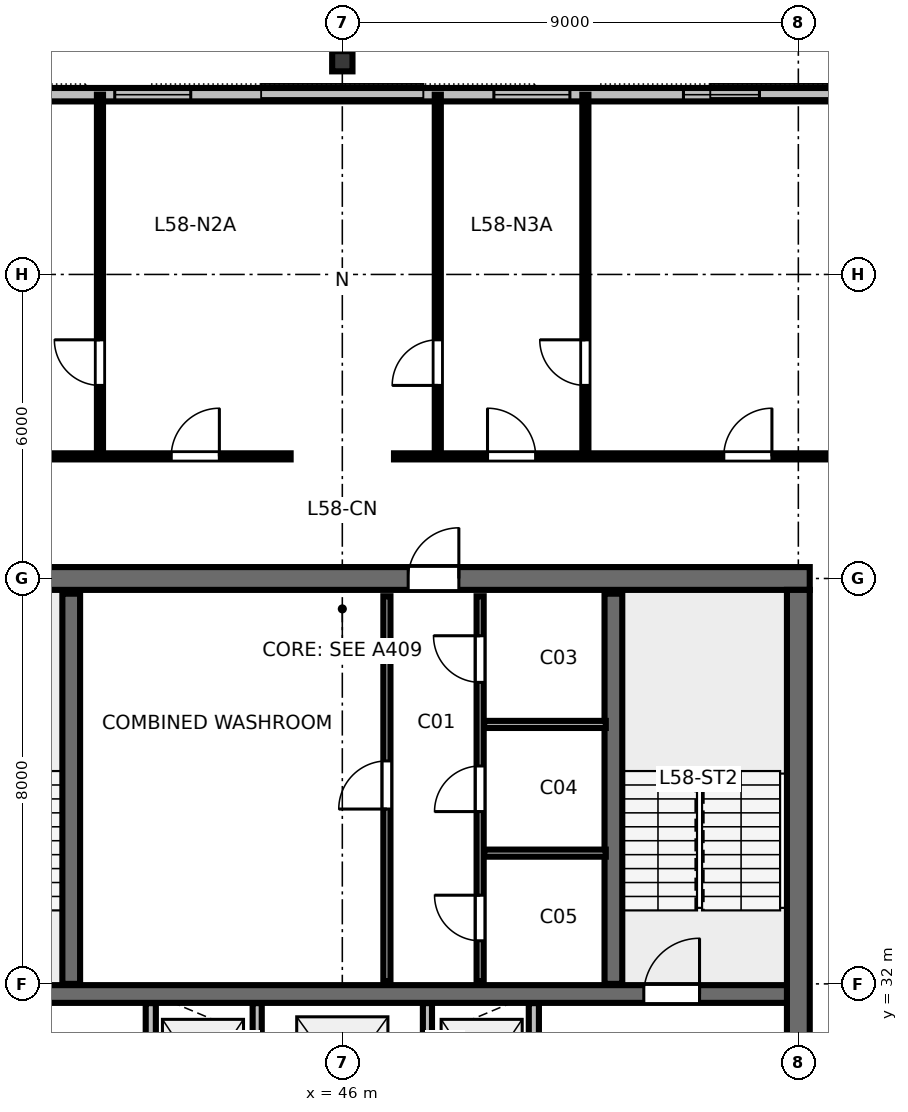
"""IFC4 building model, lengths in metres.
Left out: names, types, materials, properties, quantities, classifications, styles, units other than length and angle.
Written with IfcOpenShell. Run it as: python <this file> out.ifc"""

import sys

from ifc_helpers import new_model, si_unit, direction, frame, frame_2d, origin, origin_2d, place, context, subcontext, project, spatial, rectangle, i_section, extrude, element, fill, save


model = new_model("IFC4")
c1 = context("Model", 3, precision=1e-05, world=origin(), true_north=direction((0.0, 1.0)))
c2 = subcontext(c1, "Body", "Model", "MODEL_VIEW")
j1 = project(units=[si_unit("LENGTHUNIT", "METRE"), si_unit("PLANEANGLEUNIT", "RADIAN")], contexts=[c1])
p1 = place(None, origin())
s1 = spatial("IfcSite", under=j1, at=p1, CompositionType="ELEMENT")
p2 = place(p1, origin())
s2 = spatial("IfcBuilding", under=s1, at=p2, CompositionType="ELEMENT")
p3 = place(p2, frame((0.0, 0.0, 220.2)))
s3 = spatial("IfcBuildingStorey", under=s2, at=p3, CompositionType="ELEMENT", Elevation=220.2)
p4 = place(p3, frame((36.775, 40.0, 0.0), z_axis=(0.0, 0.0, 1.0), x_axis=(1.0, 0.0, 0.0)))
e1 = element("IfcWall", 1, at=p4, inside=s3, PredefinedType="SHEAR", context=c2, shape_type="SweptSolid", body=[
    extrude(rectangle(XDim=18.45, YDim=0.45, at=frame_2d((9.225, 0.0))), origin(), (0.0, 0.0, 1.0), 3.36),
])
p5 = place(p4, frame((10.525, 0.0, 0.0)))
e2 = element("IfcOpeningElement", 2, at=p5, cuts=e1, PredefinedType="OPENING", context=c2, shape_type="SweptSolid", body=[
    extrude(rectangle(XDim=1.0, YDim=2.15, at=frame_2d((0.5, 1.075))), frame((0.0, 0.235, 0.0), z_axis=(0.0, -1.0, 0.0), x_axis=(1.0, 0.0, 0.0)), (0.0, 0.0, 1.0), 0.47),
])
p6 = place(p3, frame((55.0, 24.225, 0.0), z_axis=(0.0, 0.0, 1.0), x_axis=(0.0, 1.0, 0.0)))
e3 = element("IfcWall", 3, at=p6, inside=s3, PredefinedType="SHEAR", context=c2, shape_type="SweptSolid", body=[
    extrude(rectangle(XDim=15.55, YDim=0.45, at=frame_2d((7.775, 0.0))), origin(), (0.0, 0.0, 1.0), 3.36),
])
p7 = place(p6, frame((5.3, 0.0, 0.0)))
e4 = element("IfcOpeningElement", 4, at=p7, cuts=e3, PredefinedType="OPENING", context=c2, shape_type="SweptSolid", body=[
    extrude(rectangle(XDim=1.15, YDim=2.15, at=frame_2d((0.575, 1.075))), frame((0.0, 0.235, 0.0), z_axis=(0.0, -1.0, 0.0), x_axis=(1.0, 0.0, 0.0)), (0.0, 0.0, 1.0), 0.47),
])
p8 = place(p3, frame((37.225, 31.8, 0.0), z_axis=(0.0, 0.0, 1.0), x_axis=(1.0, 0.0, 0.0)))
e5 = element("IfcWall", 5, at=p8, inside=s3, PredefinedType="SHEAR", context=c2, shape_type="SweptSolid", body=[
    extrude(rectangle(XDim=17.55, YDim=0.35, at=frame_2d((8.775, 0.0))), origin(), (0.0, 0.0, 1.0), 3.36),
])
p9 = place(p8, frame((0.825, 0.0, 0.0)))
e6 = element("IfcOpeningElement", 6, at=p9, cuts=e5, PredefinedType="OPENING", context=c2, shape_type="SweptSolid", body=[
    extrude(rectangle(XDim=1.1, YDim=2.15, at=frame_2d((0.55, 1.075))), frame((0.0, 0.185, 0.0), z_axis=(0.0, -1.0, 0.0), x_axis=(1.0, 0.0, 0.0)), (0.0, 0.0, 1.0), 0.37),
])
p10 = place(p8, frame((14.725, 0.0, 0.0)))
e7 = element("IfcOpeningElement", 7, at=p10, cuts=e5, PredefinedType="OPENING", context=c2, shape_type="SweptSolid", body=[
    extrude(rectangle(XDim=1.1, YDim=2.15, at=frame_2d((0.55, 1.075))), frame((0.0, 0.185, 0.0), z_axis=(0.0, -1.0, 0.0), x_axis=(1.0, 0.0, 0.0)), (0.0, 0.0, 1.0), 0.37),
])
p11 = place(p3, frame((46.0, 50.207, 0.0), z_axis=(0.0, 0.0, 1.0), x_axis=(1.0, 0.0, 0.0)))
e8 = element("IfcColumn", 8, at=p11, inside=s3, PredefinedType="COLUMN", context=c2, shape_type="SweptSolid", body=[
    extrude(i_section(OverallWidth=0.401, OverallDepth=0.399, WebThickness=0.025, FlangeThickness=0.04, FilletRadius=0.025, at=origin_2d()), origin(), (0.0, 0.0, 1.0), 3.373),
])
p12 = place(p3, frame((60.195, 49.547, 0.0), z_axis=(0.0, 0.0, 1.0), x_axis=(-1.0, 0.0, 0.0)))
e9 = element("IfcWall", 9, at=p12, inside=s3, PredefinedType="STANDARD", context=c2, shape_type="SweptSolid", body=[
    extrude(rectangle(XDim=28.389, YDim=0.265, at=frame_2d((14.195, 0.0))), origin(), (0.0, 0.0, 1.0), 3.375),
])
p13 = place(p12, frame((2.221, 0.0, 0.85)))
e10 = element("IfcOpeningElement", 10, at=p13, cuts=e9, PredefinedType="OPENING", context=c2, shape_type="SweptSolid", body=[
    extrude(rectangle(XDim=1.5, YDim=1.85, at=frame_2d((0.75, 0.925))), frame((0.0, 0.142, 0.0), z_axis=(0.0, -1.0, 0.0), x_axis=(1.0, 0.0, 0.0)), (0.0, 0.0, 1.0), 0.285),
])
p14 = place(p12, frame((5.962, 0.0, 0.85)))
e11 = element("IfcOpeningElement", 11, at=p14, cuts=e9, PredefinedType="OPENING", context=c2, shape_type="SweptSolid", body=[
    extrude(rectangle(XDim=1.5, YDim=1.85, at=frame_2d((0.75, 0.925))), frame((0.0, 0.142, 0.0), z_axis=(0.0, -1.0, 0.0), x_axis=(1.0, 0.0, 0.0)), (0.0, 0.0, 1.0), 0.285),
])
p15 = place(p12, frame((9.703, 0.0, 0.85)))
e12 = element("IfcOpeningElement", 12, at=p15, cuts=e9, PredefinedType="OPENING", context=c2, shape_type="SweptSolid", body=[
    extrude(rectangle(XDim=1.5, YDim=1.85, at=frame_2d((0.75, 0.925))), frame((0.0, 0.142, 0.0), z_axis=(0.0, -1.0, 0.0), x_axis=(1.0, 0.0, 0.0)), (0.0, 0.0, 1.0), 0.285),
])
p16 = place(p12, frame((17.186, 0.0, 0.85)))
e13 = element("IfcOpeningElement", 13, at=p16, cuts=e9, PredefinedType="OPENING", context=c2, shape_type="SweptSolid", body=[
    extrude(rectangle(XDim=1.5, YDim=1.85, at=frame_2d((0.75, 0.925))), frame((0.0, 0.142, 0.0), z_axis=(0.0, -1.0, 0.0), x_axis=(1.0, 0.0, 0.0)), (0.0, 0.0, 1.0), 0.285),
])
p17 = place(p12, frame((20.927, 0.0, 0.85)))
e14 = element("IfcOpeningElement", 14, at=p17, cuts=e9, PredefinedType="OPENING", context=c2, shape_type="SweptSolid", body=[
    extrude(rectangle(XDim=1.5, YDim=1.85, at=frame_2d((0.75, 0.925))), frame((0.0, 0.142, 0.0), z_axis=(0.0, -1.0, 0.0), x_axis=(1.0, 0.0, 0.0)), (0.0, 0.0, 1.0), 0.285),
])
p18 = place(p12, frame((24.668, 0.0, 0.85)))
e15 = element("IfcOpeningElement", 15, at=p18, cuts=e9, PredefinedType="OPENING", context=c2, shape_type="SweptSolid", body=[
    extrude(rectangle(XDim=1.5, YDim=1.85, at=frame_2d((0.75, 0.925))), frame((0.0, 0.142, 0.0), z_axis=(0.0, -1.0, 0.0), x_axis=(1.0, 0.0, 0.0)), (0.0, 0.0, 1.0), 0.285),
])
for number, where, z_axis, x_axis in (
    (16, (40.65, 32.0, 0.0), (0.0, 0.0, 1.0), (0.0, 1.0, 0.0)),
    (17, (51.35, 32.0, 0.0), (0.0, 0.0, 1.0), (0.0, 1.0, 0.0)),
):
    element("IfcWall", number, at=place(p3, frame(where, z_axis=z_axis, x_axis=x_axis)), inside=s3, PredefinedType="SHEAR", context=c2, shape_type="SweptSolid", body=[
        extrude(rectangle(XDim=7.7, YDim=0.35, at=frame_2d((3.85, 0.0))), origin(), (0.0, 0.0, 1.0), 3.6),
    ])
p19 = place(p3, frame((46.88, 32.05, 0.0), z_axis=(0.0, 0.0, 1.0), x_axis=(0.0, 1.0, 0.0)))
e18 = element("IfcWall", 18, at=p19, inside=s3, PredefinedType="PARTITIONING", context=c2, shape_type="SweptSolid", body=[
    extrude(rectangle(XDim=7.6, YDim=0.14, at=frame_2d((3.8, 0.0))), origin(), (0.0, 0.0, 1.0), 3.375),
])
p20 = place(p19, frame((3.4, 0.0, 0.0)))
e19 = element("IfcOpeningElement", 19, at=p20, cuts=e18, PredefinedType="OPENING", context=c2, shape_type="SweptSolid", body=[
    extrude(rectangle(XDim=0.95, YDim=2.15, at=frame_2d((0.475, 1.075))), frame((0.0, 0.08, 0.0), z_axis=(0.0, -1.0, 0.0), x_axis=(1.0, 0.0, 0.0)), (0.0, 0.0, 1.0), 0.16),
])
p21 = place(p3, frame((48.72, 32.05, 0.0), z_axis=(0.0, 0.0, 1.0), x_axis=(0.0, 1.0, 0.0)))
e20 = element("IfcWall", 20, at=p21, inside=s3, PredefinedType="PARTITIONING", context=c2, shape_type="SweptSolid", body=[
    extrude(rectangle(XDim=7.6, YDim=0.14, at=frame_2d((3.8, 0.0))), origin(), (0.0, 0.0, 1.0), 3.375),
])
p22 = place(p21, frame((0.8, 0.0, 0.0)))
e21 = element("IfcOpeningElement", 21, at=p22, cuts=e20, PredefinedType="OPENING", context=c2, shape_type="SweptSolid", body=[
    extrude(rectangle(XDim=0.9, YDim=2.15, at=frame_2d((0.45, 1.075))), frame((0.0, 0.08, 0.0), z_axis=(0.0, -1.0, 0.0), x_axis=(1.0, 0.0, 0.0)), (0.0, 0.0, 1.0), 0.16),
])
p23 = place(p21, frame((3.35, 0.0, 0.0)))
e22 = element("IfcOpeningElement", 22, at=p23, cuts=e20, PredefinedType="OPENING", context=c2, shape_type="SweptSolid", body=[
    extrude(rectangle(XDim=0.9, YDim=2.15, at=frame_2d((0.45, 1.075))), frame((0.0, 0.08, 0.0), z_axis=(0.0, -1.0, 0.0), x_axis=(1.0, 0.0, 0.0)), (0.0, 0.0, 1.0), 0.16),
])
p24 = place(p21, frame((5.9, 0.0, 0.0)))
e23 = element("IfcOpeningElement", 23, at=p24, cuts=e20, PredefinedType="OPENING", context=c2, shape_type="SweptSolid", body=[
    extrude(rectangle(XDim=0.92, YDim=2.15, at=frame_2d((0.46, 1.075))), frame((0.0, 0.08, 0.0), z_axis=(0.0, -1.0, 0.0), x_axis=(1.0, 0.0, 0.0)), (0.0, 0.0, 1.0), 0.16),
])
for number, where, z_axis, x_axis in (
    (24, (48.8, 34.58, 0.0), (0.0, 0.0, 1.0), (1.0, 0.0, 0.0)),
    (25, (48.8, 37.12, 0.0), (0.0, 0.0, 1.0), (1.0, 0.0, 0.0)),
):
    element("IfcWall", number, at=place(p3, frame(where, z_axis=z_axis, x_axis=x_axis)), inside=s3, PredefinedType="PARTITIONING", context=c2, shape_type="SweptSolid", body=[
        extrude(rectangle(XDim=2.4, YDim=0.14, at=frame_2d((1.2, 0.0))), origin(), (0.0, 0.0, 1.0), 3.375),
    ])
p25 = place(p3, frame((42.22, 28.58, 0.0), z_axis=(0.0, 0.0, 1.0), x_axis=(0.0, 1.0, 0.0)))
e26 = element("IfcWall", 26, at=p25, inside=s3, PredefinedType="PARTITIONING", context=c2, shape_type="SweptSolid", body=[
    extrude(rectangle(XDim=3.04, YDim=0.2, at=frame_2d((1.52, 0.0))), origin(), (0.0, 0.0, 1.0), 3.375),
])
p26 = place(p25, frame((0.95, 0.0, 0.0)))
e27 = element("IfcOpeningElement", 27, at=p26, cuts=e26, PredefinedType="OPENING", context=c2, shape_type="SweptSolid", body=[
    extrude(rectangle(XDim=1.05, YDim=2.15, at=frame_2d((0.525, 1.075))), frame((0.0, 0.11, 0.0), z_axis=(0.0, -1.0, 0.0), x_axis=(1.0, 0.0, 0.0)), (0.0, 0.0, 1.0), 0.22),
])
p27 = place(p3, frame((49.78, 28.58, 0.0), z_axis=(0.0, 0.0, 1.0), x_axis=(0.0, 1.0, 0.0)))
e28 = element("IfcWall", 28, at=p27, inside=s3, PredefinedType="PARTITIONING", context=c2, shape_type="SweptSolid", body=[
    extrude(rectangle(XDim=3.04, YDim=0.2, at=frame_2d((1.52, 0.0))), origin(), (0.0, 0.0, 1.0), 3.375),
])
p28 = place(p27, frame((0.95, 0.0, 0.0)))
e29 = element("IfcOpeningElement", 29, at=p28, cuts=e28, PredefinedType="OPENING", context=c2, shape_type="SweptSolid", body=[
    extrude(rectangle(XDim=1.05, YDim=2.15, at=frame_2d((0.525, 1.075))), frame((0.0, 0.11, 0.0), z_axis=(0.0, -1.0, 0.0), x_axis=(1.0, 0.0, 0.0)), (0.0, 0.0, 1.0), 0.22),
])
for number, where, z_axis, x_axis in (
    (30, (44.32, 28.58, 0.0), (0.0, 0.0, 1.0), (0.0, 1.0, 0.0)),
    (31, (47.68, 28.58, 0.0), (0.0, 0.0, 1.0), (0.0, 1.0, 0.0)),
):
    element("IfcWall", number, at=place(p3, frame(where, z_axis=z_axis, x_axis=x_axis)), inside=s3, PredefinedType="PARTITIONING", context=c2, shape_type="SweptSolid", body=[
        extrude(rectangle(XDim=3.04, YDim=0.18, at=frame_2d((1.52, 0.0))), origin(), (0.0, 0.0, 1.0), 3.375),
    ])
p29 = place(p3, frame((41.217, 42.41, 0.0), z_axis=(0.0, 0.0, 1.0), x_axis=(0.0, 1.0, 0.0)))
e32 = element("IfcWall", 32, at=p29, inside=s3, PredefinedType="PARTITIONING", context=c2, shape_type="SweptSolid", body=[
    extrude(rectangle(XDim=7.137, YDim=0.12, at=frame_2d((3.569, 0.0))), origin(), (0.0, 0.0, 1.0), 2.655),
])
p30 = place(p29, frame((1.4, 0.0, 0.0)))
e33 = element("IfcOpeningElement", 33, at=p30, cuts=e32, PredefinedType="OPENING", context=c2, shape_type="SweptSolid", body=[
    extrude(rectangle(XDim=0.9, YDim=2.15, at=frame_2d((0.45, 1.075))), frame((0.0, 0.07, 0.0), z_axis=(0.0, -1.0, 0.0), x_axis=(1.0, 0.0, 0.0)), (0.0, 0.0, 1.0), 0.14),
])
p31 = place(p3, frame((47.885, 42.41, 0.0), z_axis=(0.0, 0.0, 1.0), x_axis=(0.0, 1.0, 0.0)))
e34 = element("IfcWall", 34, at=p31, inside=s3, PredefinedType="PARTITIONING", context=c2, shape_type="SweptSolid", body=[
    extrude(rectangle(XDim=7.137, YDim=0.12, at=frame_2d((3.569, 0.0))), origin(), (0.0, 0.0, 1.0), 2.655),
])
p32 = place(p31, frame((1.4, 0.0, 0.0)))
e35 = element("IfcOpeningElement", 35, at=p32, cuts=e34, PredefinedType="OPENING", context=c2, shape_type="SweptSolid", body=[
    extrude(rectangle(XDim=0.9, YDim=2.15, at=frame_2d((0.45, 1.075))), frame((0.0, 0.07, 0.0), z_axis=(0.0, -1.0, 0.0), x_axis=(1.0, 0.0, 0.0)), (0.0, 0.0, 1.0), 0.14),
])
p33 = place(p3, frame((50.797, 42.41, 0.0), z_axis=(0.0, 0.0, 1.0), x_axis=(0.0, 1.0, 0.0)))
e36 = element("IfcWall", 36, at=p33, inside=s3, PredefinedType="PARTITIONING", context=c2, shape_type="SweptSolid", body=[
    extrude(rectangle(XDim=7.137, YDim=0.12, at=frame_2d((3.569, 0.0))), origin(), (0.0, 0.0, 1.0), 2.655),
])
p34 = place(p33, frame((1.4, 0.0, 0.0)))
e37 = element("IfcOpeningElement", 37, at=p34, cuts=e36, PredefinedType="OPENING", context=c2, shape_type="SweptSolid", body=[
    extrude(rectangle(XDim=0.9, YDim=2.15, at=frame_2d((0.45, 1.075))), frame((0.0, 0.07, 0.0), z_axis=(0.0, -1.0, 0.0), x_axis=(1.0, 0.0, 0.0)), (0.0, 0.0, 1.0), 0.14),
])
p35 = place(p3, frame((34.65, 42.41, 0.0), z_axis=(0.0, 0.0, 1.0), x_axis=(1.0, 0.0, 0.0)))
e38 = element("IfcWall", 38, at=p35, inside=s3, PredefinedType="PARTITIONING", context=c2, shape_type="SweptSolid", body=[
    extrude(rectangle(XDim=10.33, YDim=0.12, at=frame_2d((5.165, 0.0))), origin(), (0.0, 0.0, 1.0), 2.655),
])
p36 = place(p35, frame((2.878, 0.0, 0.0)))
e39 = element("IfcOpeningElement", 39, at=p36, cuts=e38, PredefinedType="OPENING", context=c2, shape_type="SweptSolid", body=[
    extrude(rectangle(XDim=0.95, YDim=2.15, at=frame_2d((0.475, 1.075))), frame((0.0, 0.07, 0.0), z_axis=(0.0, -1.0, 0.0), x_axis=(1.0, 0.0, 0.0)), (0.0, 0.0, 1.0), 0.14),
])
p37 = place(p35, frame((7.974, 0.0, 0.0)))
e40 = element("IfcOpeningElement", 40, at=p37, cuts=e38, PredefinedType="OPENING", context=c2, shape_type="SweptSolid", body=[
    extrude(rectangle(XDim=0.95, YDim=2.15, at=frame_2d((0.475, 1.075))), frame((0.0, 0.07, 0.0), z_axis=(0.0, -1.0, 0.0), x_axis=(1.0, 0.0, 0.0)), (0.0, 0.0, 1.0), 0.14),
])
p38 = place(p3, frame((47.02, 42.41, 0.0), z_axis=(0.0, 0.0, 1.0), x_axis=(1.0, 0.0, 0.0)))
e41 = element("IfcWall", 41, at=p38, inside=s3, PredefinedType="PARTITIONING", context=c2, shape_type="SweptSolid", body=[
    extrude(rectangle(XDim=10.33, YDim=0.12, at=frame_2d((5.165, 0.0))), origin(), (0.0, 0.0, 1.0), 2.655),
])
p39 = place(p38, frame((1.846, 0.0, 0.0)))
e42 = element("IfcOpeningElement", 42, at=p39, cuts=e41, PredefinedType="OPENING", context=c2, shape_type="SweptSolid", body=[
    extrude(rectangle(XDim=0.95, YDim=2.15, at=frame_2d((0.475, 1.075))), frame((0.0, 0.07, 0.0), z_axis=(0.0, -1.0, 0.0), x_axis=(1.0, 0.0, 0.0)), (0.0, 0.0, 1.0), 0.14),
])
p40 = place(p38, frame((6.509, 0.0, 0.0)))
e43 = element("IfcOpeningElement", 43, at=p40, cuts=e41, PredefinedType="OPENING", context=c2, shape_type="SweptSolid", body=[
    extrude(rectangle(XDim=0.95, YDim=2.15, at=frame_2d((0.475, 1.075))), frame((0.0, 0.07, 0.0), z_axis=(0.0, -1.0, 0.0), x_axis=(1.0, 0.0, 0.0)), (0.0, 0.0, 1.0), 0.14),
])
p41 = place(p14, origin())
e44 = element("IfcWindow", 44, at=p41, inside=s3, PartitioningType="SINGLE_PANEL", PredefinedType="WINDOW", context=c2, shape_type="SweptSolid", body=[
    extrude(rectangle(XDim=1.5, YDim=1.85, at=frame_2d((0.75, 0.925))), frame((0.0, 0.03, 0.0), z_axis=(0.0, -1.0, 0.0), x_axis=(1.0, 0.0, 0.0)), (0.0, 0.0, 1.0), 0.06),
])
fill(e11, e44)
p42 = place(p15, origin())
e45 = element("IfcWindow", 45, at=p42, inside=s3, PartitioningType="SINGLE_PANEL", PredefinedType="WINDOW", context=c2, shape_type="SweptSolid", body=[
    extrude(rectangle(XDim=1.5, YDim=1.85, at=frame_2d((0.75, 0.925))), frame((0.0, 0.03, 0.0), z_axis=(0.0, -1.0, 0.0), x_axis=(1.0, 0.0, 0.0)), (0.0, 0.0, 1.0), 0.06),
])
fill(e12, e45)
p43 = place(p16, origin())
e46 = element("IfcWindow", 46, at=p43, inside=s3, PartitioningType="SINGLE_PANEL", PredefinedType="WINDOW", context=c2, shape_type="SweptSolid", body=[
    extrude(rectangle(XDim=1.5, YDim=1.85, at=frame_2d((0.75, 0.925))), frame((0.0, 0.03, 0.0), z_axis=(0.0, -1.0, 0.0), x_axis=(1.0, 0.0, 0.0)), (0.0, 0.0, 1.0), 0.06),
])
fill(e13, e46)
p44 = place(p10, origin())
e47 = element("IfcDoor", 47, at=p44, inside=s3, OperationType="SINGLE_SWING_RIGHT", PredefinedType="DOOR", context=c2, shape_type="SweptSolid", body=[
    extrude(rectangle(XDim=1.1, YDim=2.15, at=frame_2d((0.55, 1.075))), frame((0.0, 0.025, 0.0), z_axis=(0.0, -1.0, 0.0), x_axis=(1.0, 0.0, 0.0)), (0.0, 0.0, 1.0), 0.05),
])
fill(e7, e47)
p45 = place(p5, origin())
e48 = element("IfcDoor", 48, at=p45, inside=s3, OperationType="SINGLE_SWING_RIGHT", PredefinedType="DOOR", context=c2, shape_type="SweptSolid", body=[
    extrude(rectangle(XDim=1.0, YDim=2.15, at=frame_2d((0.5, 1.075))), frame((0.0, 0.025, 0.0), z_axis=(0.0, -1.0, 0.0), x_axis=(1.0, 0.0, 0.0)), (0.0, 0.0, 1.0), 0.05),
])
fill(e2, e48)
p46 = place(p20, origin())
e49 = element("IfcDoor", 49, at=p46, inside=s3, OperationType="SINGLE_SWING_LEFT", PredefinedType="DOOR", context=c2, shape_type="SweptSolid", body=[
    extrude(rectangle(XDim=0.95, YDim=2.15, at=frame_2d((0.475, 1.075))), frame((0.0, 0.025, 0.0), z_axis=(0.0, -1.0, 0.0), x_axis=(1.0, 0.0, 0.0)), (0.0, 0.0, 1.0), 0.05),
])
fill(e19, e49)
p47 = place(p22, origin())
e50 = element("IfcDoor", 50, at=p47, inside=s3, OperationType="SINGLE_SWING_RIGHT", PredefinedType="DOOR", context=c2, shape_type="SweptSolid", body=[
    extrude(rectangle(XDim=0.9, YDim=2.15, at=frame_2d((0.45, 1.075))), frame((0.0, 0.025, 0.0), z_axis=(0.0, -1.0, 0.0), x_axis=(1.0, 0.0, 0.0)), (0.0, 0.0, 1.0), 0.05),
])
fill(e21, e50)
p48 = place(p23, origin())
e51 = element("IfcDoor", 51, at=p48, inside=s3, OperationType="SINGLE_SWING_LEFT", PredefinedType="DOOR", context=c2, shape_type="SweptSolid", body=[
    extrude(rectangle(XDim=0.9, YDim=2.15, at=frame_2d((0.45, 1.075))), frame((0.0, 0.025, 0.0), z_axis=(0.0, -1.0, 0.0), x_axis=(1.0, 0.0, 0.0)), (0.0, 0.0, 1.0), 0.05),
])
fill(e22, e51)
p49 = place(p24, origin())
e52 = element("IfcDoor", 52, at=p49, inside=s3, OperationType="SINGLE_SWING_RIGHT", PredefinedType="DOOR", context=c2, shape_type="SweptSolid", body=[
    extrude(rectangle(XDim=0.92, YDim=2.15, at=frame_2d((0.46, 1.075))), frame((0.0, 0.025, 0.0), z_axis=(0.0, -1.0, 0.0), x_axis=(1.0, 0.0, 0.0)), (0.0, 0.0, 1.0), 0.05),
])
fill(e23, e52)
p50 = place(p30, origin())
e53 = element("IfcDoor", 53, at=p50, inside=s3, OperationType="SINGLE_SWING_RIGHT", PredefinedType="DOOR", context=c2, shape_type="SweptSolid", body=[
    extrude(rectangle(XDim=0.9, YDim=2.15, at=frame_2d((0.45, 1.075))), frame((0.0, 0.025, 0.0), z_axis=(0.0, -1.0, 0.0), x_axis=(1.0, 0.0, 0.0)), (0.0, 0.0, 1.0), 0.05),
])
fill(e33, e53)
p51 = place(p32, origin())
e54 = element("IfcDoor", 54, at=p51, inside=s3, OperationType="SINGLE_SWING_LEFT", PredefinedType="DOOR", context=c2, shape_type="SweptSolid", body=[
    extrude(rectangle(XDim=0.9, YDim=2.15, at=frame_2d((0.45, 1.075))), frame((0.0, 0.025, 0.0), z_axis=(0.0, -1.0, 0.0), x_axis=(1.0, 0.0, 0.0)), (0.0, 0.0, 1.0), 0.05),
])
fill(e35, e54)
p52 = place(p34, origin())
e55 = element("IfcDoor", 55, at=p52, inside=s3, OperationType="SINGLE_SWING_RIGHT", PredefinedType="DOOR", context=c2, shape_type="SweptSolid", body=[
    extrude(rectangle(XDim=0.9, YDim=2.15, at=frame_2d((0.45, 1.075))), frame((0.0, 0.025, 0.0), z_axis=(0.0, -1.0, 0.0), x_axis=(1.0, 0.0, 0.0)), (0.0, 0.0, 1.0), 0.05),
])
fill(e37, e55)
p53 = place(p37, origin())
e56 = element("IfcDoor", 56, at=p53, inside=s3, OperationType="SINGLE_SWING_RIGHT", PredefinedType="DOOR", context=c2, shape_type="SweptSolid", body=[
    extrude(rectangle(XDim=0.95, YDim=2.15, at=frame_2d((0.475, 1.075))), frame((0.0, 0.025, 0.0), z_axis=(0.0, -1.0, 0.0), x_axis=(1.0, 0.0, 0.0)), (0.0, 0.0, 1.0), 0.05),
])
fill(e40, e56)
p54 = place(p39, origin())
e57 = element("IfcDoor", 57, at=p54, inside=s3, OperationType="SINGLE_SWING_LEFT", PredefinedType="DOOR", context=c2, shape_type="SweptSolid", body=[
    extrude(rectangle(XDim=0.95, YDim=2.15, at=frame_2d((0.475, 1.075))), frame((0.0, 0.025, 0.0), z_axis=(0.0, -1.0, 0.0), x_axis=(1.0, 0.0, 0.0)), (0.0, 0.0, 1.0), 0.05),
])
fill(e42, e57)
p55 = place(p40, origin())
e58 = element("IfcDoor", 58, at=p55, inside=s3, OperationType="SINGLE_SWING_RIGHT", PredefinedType="DOOR", context=c2, shape_type="SweptSolid", body=[
    extrude(rectangle(XDim=0.95, YDim=2.15, at=frame_2d((0.475, 1.075))), frame((0.0, 0.025, 0.0), z_axis=(0.0, -1.0, 0.0), x_axis=(1.0, 0.0, 0.0)), (0.0, 0.0, 1.0), 0.05),
])
fill(e43, e58)
save(model, sys.argv[1])
